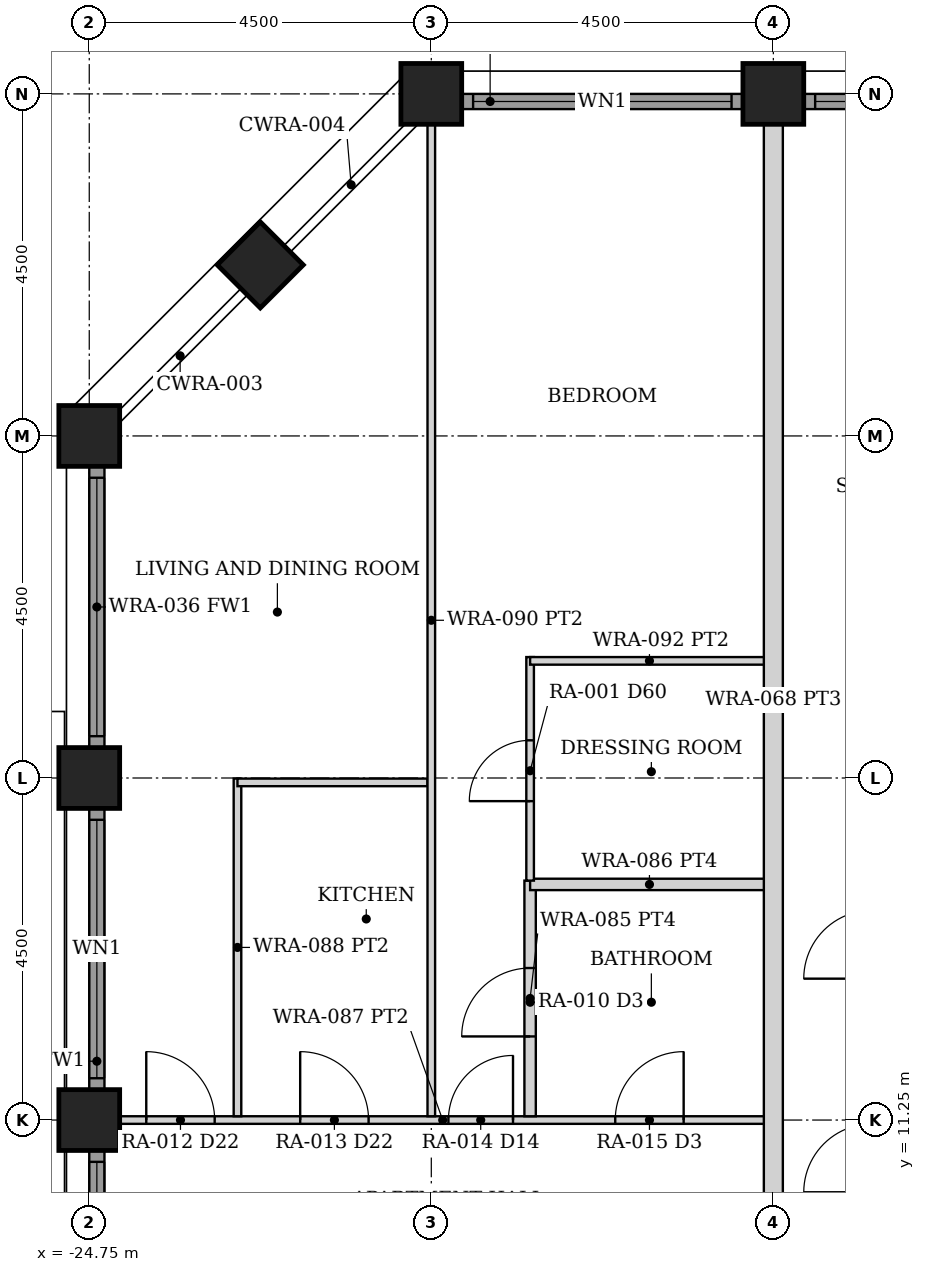
"""IFC4 building model, lengths in metres.
Left out: names, types, materials, properties, quantities, classifications, styles, units other than length and angle.
Written with IfcOpenShell. Run it as: python <this file> out.ifc"""

import sys

from ifc_helpers import new_model, si_unit, direction, frame, frame_2d, origin, origin_2d, place, context, subcontext, project, spatial, rectangle, hollow_rectangle, extrude, element, fill, save


model = new_model("IFC4")
c1 = context("Model", 3, precision=1e-05, world=origin(), true_north=direction((0.0, 1.0)))
c2 = subcontext(c1, "Body", "Model", "MODEL_VIEW")
j1 = project(units=[si_unit("LENGTHUNIT", "METRE"), si_unit("PLANEANGLEUNIT", "RADIAN")], contexts=[c1])
p1 = place(None, origin())
s1 = spatial("IfcSite", under=j1, at=p1, CompositionType="ELEMENT")
p2 = place(p1, origin())
s2 = spatial("IfcBuilding", under=s1, at=p2, CompositionType="ELEMENT")
p3 = place(p2, frame((0.0, 0.0, 26.5)))
s3 = spatial("IfcBuildingStorey", under=s2, at=p3, CompositionType="ELEMENT", Elevation=26.5)
for number, where, z_axis, x_axis in (
    (1, (-20.25, 24.75, 0.0), (0.0, 0.0, 1.0), (0.0, 1.0, 0.0)),
    (2, (-15.75, 24.75, 0.0), (0.0, 0.0, 1.0), (0.0, 1.0, 0.0)),
    (3, (-24.75, 11.25, 0.0), (0.0, 0.0, 1.0), (1.0, 0.0, 0.0)),
    (4, (-24.75, 15.75, 0.0), (0.0, 0.0, 1.0), (1.0, 0.0, 0.0)),
    (5, (-24.75, 20.25, 0.0), (0.0, 0.0, 1.0), (1.0, 0.0, 0.0)),
    (6, (-22.5, 22.5, 0.0), (0.0, 0.0, 1.0), (0.707, -0.707, 0.0)),
):
    element("IfcColumn", number, at=place(p3, frame(where, z_axis=z_axis, x_axis=x_axis)), inside=s3, PredefinedType="COLUMN", context=c2, shape_type="SweptSolid", body=[
        extrude(hollow_rectangle(XDim=0.8, YDim=0.8, WallThickness=0.08, at=origin_2d()), origin(), (0.0, 0.0, 1.0), 3.5),
    ])
p4 = place(p3, frame((-19.845, 24.65, 0.0), z_axis=(0.0, 0.0, 1.0), x_axis=(1.0, 0.0, 0.0)))
e7 = element("IfcWall", 7, at=p4, inside=s3, PredefinedType="SOLIDWALL", context=c2, shape_type="SweptSolid", body=[
    extrude(rectangle(XDim=3.69, YDim=0.2, at=frame_2d((1.845, 0.0))), origin(), (0.0, 0.0, 1.0), 2.379),
])
p5 = place(p4, frame((0.145, 0.0, 0.3)))
e8 = element("IfcOpeningElement", 8, at=p5, cuts=e7, PredefinedType="OPENING", context=c2, shape_type="SweptSolid", body=[
    extrude(rectangle(XDim=3.4, YDim=1.929, at=frame_2d((1.7, 0.964))), frame((0.0, 0.11, 0.0), z_axis=(0.0, -1.0, 0.0), x_axis=(1.0, 0.0, 0.0)), (0.0, 0.0, 1.0), 0.22),
])
p6 = place(p3, frame((-15.345, 24.65, 0.0), z_axis=(0.0, 0.0, 1.0), x_axis=(1.0, 0.0, 0.0)))
e9 = element("IfcWall", 9, at=p6, inside=s3, PredefinedType="SOLIDWALL", context=c2, shape_type="SweptSolid", body=[
    extrude(rectangle(XDim=3.69, YDim=0.2, at=frame_2d((1.845, 0.0))), origin(), (0.0, 0.0, 1.0), 2.379),
])
p7 = place(p6, frame((0.145, 0.0, 0.3)))
e10 = element("IfcOpeningElement", 10, at=p7, cuts=e9, PredefinedType="OPENING", context=c2, shape_type="SweptSolid", body=[
    extrude(rectangle(XDim=3.4, YDim=1.929, at=frame_2d((1.7, 0.964))), frame((0.0, 0.11, 0.0), z_axis=(0.0, -1.0, 0.0), x_axis=(1.0, 0.0, 0.0)), (0.0, 0.0, 1.0), 0.22),
])
p8 = place(p3, frame((-24.65, 7.155, 0.0), z_axis=(0.0, 0.0, 1.0), x_axis=(0.0, 1.0, 0.0)))
e11 = element("IfcWall", 11, at=p8, inside=s3, PredefinedType="SOLIDWALL", context=c2, shape_type="SweptSolid", body=[
    extrude(rectangle(XDim=3.69, YDim=0.2, at=frame_2d((1.845, 0.0))), origin(), (0.0, 0.0, 1.0), 2.379),
])
p9 = place(p8, frame((0.145, 0.0, 0.3)))
e12 = element("IfcOpeningElement", 12, at=p9, cuts=e11, PredefinedType="OPENING", context=c2, shape_type="SweptSolid", body=[
    extrude(rectangle(XDim=3.4, YDim=1.929, at=frame_2d((1.7, 0.964))), frame((0.0, 0.11, 0.0), z_axis=(0.0, -1.0, 0.0), x_axis=(1.0, 0.0, 0.0)), (0.0, 0.0, 1.0), 0.22),
])
p10 = place(p3, frame((-24.65, 11.655, 0.0), z_axis=(0.0, 0.0, 1.0), x_axis=(0.0, 1.0, 0.0)))
e13 = element("IfcWall", 13, at=p10, inside=s3, PredefinedType="SOLIDWALL", context=c2, shape_type="SweptSolid", body=[
    extrude(rectangle(XDim=3.69, YDim=0.2, at=frame_2d((1.845, 0.0))), origin(), (0.0, 0.0, 1.0), 2.379),
])
p11 = place(p10, frame((0.145, 0.0, 0.3)))
e14 = element("IfcOpeningElement", 14, at=p11, cuts=e13, PredefinedType="OPENING", context=c2, shape_type="SweptSolid", body=[
    extrude(rectangle(XDim=3.4, YDim=1.929, at=frame_2d((1.7, 0.964))), frame((0.0, 0.11, 0.0), z_axis=(0.0, -1.0, 0.0), x_axis=(1.0, 0.0, 0.0)), (0.0, 0.0, 1.0), 0.22),
])
p12 = place(p3, frame((-24.65, 16.155, 0.0), z_axis=(0.0, 0.0, 1.0), x_axis=(0.0, 1.0, 0.0)))
e15 = element("IfcWall", 15, at=p12, inside=s3, PredefinedType="SOLIDWALL", context=c2, shape_type="SweptSolid", body=[
    extrude(rectangle(XDim=3.69, YDim=0.2, at=frame_2d((1.845, 0.0))), origin(), (0.0, 0.0, 1.0), 2.379),
])
p13 = place(p12, frame((0.145, 0.0, 0.3)))
e16 = element("IfcOpeningElement", 16, at=p13, cuts=e15, PredefinedType="OPENING", context=c2, shape_type="SweptSolid", body=[
    extrude(rectangle(XDim=3.4, YDim=1.929, at=frame_2d((1.7, 0.964))), frame((0.0, 0.11, 0.0), z_axis=(0.0, -1.0, 0.0), x_axis=(1.0, 0.0, 0.0)), (0.0, 0.0, 1.0), 0.22),
])
p14 = place(p3, frame((-24.35, 11.25, 0.0), z_axis=(0.0, 0.0, 1.0), x_axis=(1.0, 0.0, 0.0)))
e17 = element("IfcWall", 17, at=p14, inside=s3, PredefinedType="PARTITIONING", context=c2, shape_type="SweptSolid", body=[
    extrude(rectangle(XDim=8.5, YDim=0.1, at=frame_2d((4.25, 0.0))), origin(), (0.0, 0.0, 1.0), 2.373),
])
p15 = place(p14, frame((2.375, 0.0, 0.0)))
e18 = element("IfcOpeningElement", 18, at=p15, cuts=e17, PredefinedType="OPENING", context=c2, shape_type="SweptSolid", body=[
    extrude(rectangle(XDim=0.9, YDim=2.1, at=frame_2d((0.45, 1.05))), frame((0.0, 0.06, 0.0), z_axis=(0.0, -1.0, 0.0), x_axis=(1.0, 0.0, 0.0)), (0.0, 0.0, 1.0), 0.12),
])
p16 = place(p14, frame((0.35, 0.0, 0.0)))
e19 = element("IfcOpeningElement", 19, at=p16, cuts=e17, PredefinedType="OPENING", context=c2, shape_type="SweptSolid", body=[
    extrude(rectangle(XDim=0.9, YDim=2.1, at=frame_2d((0.45, 1.05))), frame((0.0, 0.06, 0.0), z_axis=(0.0, -1.0, 0.0), x_axis=(1.0, 0.0, 0.0)), (0.0, 0.0, 1.0), 0.12),
])
p17 = place(p14, frame((4.325, 0.0, 0.0)))
e20 = element("IfcOpeningElement", 20, at=p17, cuts=e17, PredefinedType="OPENING", context=c2, shape_type="SweptSolid", body=[
    extrude(rectangle(XDim=0.85, YDim=2.1, at=frame_2d((0.425, 1.05))), frame((0.0, 0.06, 0.0), z_axis=(0.0, -1.0, 0.0), x_axis=(1.0, 0.0, 0.0)), (0.0, 0.0, 1.0), 0.12),
])
p18 = place(p14, frame((6.52, 0.0, 0.0)))
e21 = element("IfcOpeningElement", 21, at=p18, cuts=e17, PredefinedType="OPENING", context=c2, shape_type="SweptSolid", body=[
    extrude(rectangle(XDim=0.9, YDim=2.1, at=frame_2d((0.45, 1.05))), frame((0.0, 0.06, 0.0), z_axis=(0.0, -1.0, 0.0), x_axis=(1.0, 0.0, 0.0)), (0.0, 0.0, 1.0), 0.12),
])
p19 = place(p3, frame((-22.8, 11.3, 0.0), z_axis=(0.0, 0.0, 1.0), x_axis=(0.0, 1.0, 0.0)))
e22 = element("IfcWall", 22, at=p19, inside=s3, PredefinedType="PARTITIONING", context=c2, shape_type="SweptSolid", body=[
    extrude(rectangle(XDim=4.442, YDim=0.1, at=frame_2d((2.221, 0.0))), origin(), (0.0, 0.0, 1.0), 2.373),
])
p20 = place(p3, frame((-22.8, 15.692, 0.0), z_axis=(0.0, 0.0, 1.0), x_axis=(1.0, 0.0, 0.0)))
e23 = element("IfcWall", 23, at=p20, inside=s3, PredefinedType="PARTITIONING", context=c2, shape_type="SweptSolid", body=[
    extrude(rectangle(XDim=2.5, YDim=0.1, at=frame_2d((1.25, 0.0))), origin(), (0.0, 0.0, 1.0), 2.373),
])
p21 = place(p3, frame((-20.25, 11.3, 0.0), z_axis=(0.0, 0.0, 1.0), x_axis=(0.0, 1.0, 0.0)))
e24 = element("IfcWall", 24, at=p21, inside=s3, PredefinedType="PARTITIONING", context=c2, shape_type="SweptSolid", body=[
    extrude(rectangle(XDim=13.05, YDim=0.1, at=frame_2d((6.525, 0.0))), origin(), (0.0, 0.0, 1.0), 2.373),
])
p22 = place(p3, frame((-18.95, 11.3, 0.0), z_axis=(0.0, 0.0, 1.0), x_axis=(0.0, 1.0, 0.0)))
e25 = element("IfcWall", 25, at=p22, inside=s3, PredefinedType="PARTITIONING", context=c2, shape_type="SweptSolid", body=[
    extrude(rectangle(XDim=3.1, YDim=0.15, at=frame_2d((1.55, 0.0))), origin(), (0.0, 0.0, 1.0), 2.373),
])
p23 = place(p22, frame((1.05, 0.0, 0.0)))
e26 = element("IfcOpeningElement", 26, at=p23, cuts=e25, PredefinedType="OPENING", context=c2, shape_type="SweptSolid", body=[
    extrude(rectangle(XDim=0.9, YDim=2.1, at=frame_2d((0.45, 1.05))), frame((0.0, 0.085, 0.0), z_axis=(0.0, -1.0, 0.0), x_axis=(1.0, 0.0, 0.0)), (0.0, 0.0, 1.0), 0.17),
])
p24 = place(p3, frame((-18.95, 14.35, 0.0), z_axis=(0.0, 0.0, 1.0), x_axis=(1.0, 0.0, 0.0)))
e27 = element("IfcWall", 27, at=p24, inside=s3, PredefinedType="PARTITIONING", context=c2, shape_type="SweptSolid", body=[
    extrude(rectangle(XDim=3.14, YDim=0.15, at=frame_2d((1.57, 0.0))), origin(), (0.0, 0.0, 1.0), 2.373),
])
p25 = place(p3, frame((-18.95, 14.4, 0.0), z_axis=(0.0, 0.0, 1.0), x_axis=(0.0, 1.0, 0.0)))
e28 = element("IfcWall", 28, at=p25, inside=s3, PredefinedType="PARTITIONING", context=c2, shape_type="SweptSolid", body=[
    extrude(rectangle(XDim=2.941, YDim=0.1, at=frame_2d((1.47, 0.0))), origin(), (0.0, 0.0, 1.0), 2.373),
])
p26 = place(p25, frame((1.045, 0.0, 0.0)))
e29 = element("IfcOpeningElement", 29, at=p26, cuts=e28, PredefinedType="OPENING", context=c2, shape_type="SweptSolid", body=[
    extrude(rectangle(XDim=0.8, YDim=2.1, at=frame_2d((0.4, 1.05))), frame((0.0, 0.06, 0.0), z_axis=(0.0, -1.0, 0.0), x_axis=(1.0, 0.0, 0.0)), (0.0, 0.0, 1.0), 0.12),
])
p27 = place(p3, frame((-18.95, 17.291, 0.0), z_axis=(0.0, 0.0, 1.0), x_axis=(1.0, 0.0, 0.0)))
e30 = element("IfcWall", 30, at=p27, inside=s3, PredefinedType="PARTITIONING", context=c2, shape_type="SweptSolid", body=[
    extrude(rectangle(XDim=3.14, YDim=0.1, at=frame_2d((1.57, 0.0))), origin(), (0.0, 0.0, 1.0), 2.373),
])
p28 = place(p3, frame((-15.75, 9.2, 0.0), z_axis=(0.0, 0.0, 1.0), x_axis=(0.0, 1.0, 0.0)))
e31 = element("IfcWall", 31, at=p28, inside=s3, PredefinedType="PARTITIONING", context=c2, shape_type="SweptSolid", body=[
    extrude(rectangle(XDim=15.15, YDim=0.25, at=frame_2d((7.575, 0.0))), origin(), (0.0, 0.0, 1.0), 2.373),
])
p29 = place(p5, origin())
e32 = element("IfcWindow", 32, at=p29, inside=s3, PartitioningType="SINGLE_PANEL", PredefinedType="WINDOW", context=c2, shape_type="SweptSolid", body=[
    extrude(rectangle(XDim=3.4, YDim=1.929, at=frame_2d((1.7, 0.964))), frame((0.0, 0.03, 0.0), z_axis=(0.0, -1.0, 0.0), x_axis=(1.0, 0.0, 0.0)), (0.0, 0.0, 1.0), 0.06),
])
fill(e8, e32)
p30 = place(p7, origin())
e33 = element("IfcWindow", 33, at=p30, inside=s3, PartitioningType="SINGLE_PANEL", PredefinedType="WINDOW", context=c2, shape_type="SweptSolid", body=[
    extrude(rectangle(XDim=3.4, YDim=1.929, at=frame_2d((1.7, 0.964))), frame((0.0, 0.03, 0.0), z_axis=(0.0, -1.0, 0.0), x_axis=(1.0, 0.0, 0.0)), (0.0, 0.0, 1.0), 0.06),
])
fill(e10, e33)
p31 = place(p9, origin())
e34 = element("IfcWindow", 34, at=p31, inside=s3, PartitioningType="SINGLE_PANEL", PredefinedType="WINDOW", context=c2, shape_type="SweptSolid", body=[
    extrude(rectangle(XDim=3.4, YDim=1.929, at=frame_2d((1.7, 0.964))), frame((0.0, 0.03, 0.0), z_axis=(0.0, -1.0, 0.0), x_axis=(1.0, 0.0, 0.0)), (0.0, 0.0, 1.0), 0.06),
])
fill(e12, e34)
p32 = place(p11, origin())
e35 = element("IfcWindow", 35, at=p32, inside=s3, PartitioningType="SINGLE_PANEL", PredefinedType="WINDOW", context=c2, shape_type="SweptSolid", body=[
    extrude(rectangle(XDim=3.4, YDim=1.929, at=frame_2d((1.7, 0.964))), frame((0.0, 0.03, 0.0), z_axis=(0.0, -1.0, 0.0), x_axis=(1.0, 0.0, 0.0)), (0.0, 0.0, 1.0), 0.06),
])
fill(e14, e35)
p33 = place(p13, origin())
e36 = element("IfcWindow", 36, at=p33, inside=s3, PartitioningType="SINGLE_PANEL", PredefinedType="WINDOW", context=c2, shape_type="SweptSolid", body=[
    extrude(rectangle(XDim=3.4, YDim=1.929, at=frame_2d((1.7, 0.964))), frame((0.0, 0.03, 0.0), z_axis=(0.0, -1.0, 0.0), x_axis=(1.0, 0.0, 0.0)), (0.0, 0.0, 1.0), 0.06),
])
fill(e16, e36)
p34 = place(p15, origin())
e37 = element("IfcDoor", 37, at=p34, inside=s3, OperationType="SINGLE_SWING_LEFT", PredefinedType="DOOR", context=c2, shape_type="SweptSolid", body=[
    extrude(rectangle(XDim=0.9, YDim=2.1, at=frame_2d((0.45, 1.05))), frame((0.0, 0.025, 0.0), z_axis=(0.0, -1.0, 0.0), x_axis=(1.0, 0.0, 0.0)), (0.0, 0.0, 1.0), 0.05),
])
fill(e18, e37)
p35 = place(p16, origin())
e38 = element("IfcDoor", 38, at=p35, inside=s3, OperationType="SINGLE_SWING_LEFT", PredefinedType="DOOR", context=c2, shape_type="SweptSolid", body=[
    extrude(rectangle(XDim=0.9, YDim=2.1, at=frame_2d((0.45, 1.05))), frame((0.0, 0.025, 0.0), z_axis=(0.0, -1.0, 0.0), x_axis=(1.0, 0.0, 0.0)), (0.0, 0.0, 1.0), 0.05),
])
fill(e19, e38)
p36 = place(p17, origin())
e39 = element("IfcDoor", 39, at=p36, inside=s3, OperationType="SINGLE_SWING_RIGHT", PredefinedType="DOOR", context=c2, shape_type="SweptSolid", body=[
    extrude(rectangle(XDim=0.85, YDim=2.1, at=frame_2d((0.425, 1.05))), frame((0.0, 0.025, 0.0), z_axis=(0.0, -1.0, 0.0), x_axis=(1.0, 0.0, 0.0)), (0.0, 0.0, 1.0), 0.05),
])
fill(e20, e39)
p37 = place(p23, origin())
e40 = element("IfcDoor", 40, at=p37, inside=s3, OperationType="SINGLE_SWING_LEFT", PredefinedType="DOOR", context=c2, shape_type="SweptSolid", body=[
    extrude(rectangle(XDim=0.9, YDim=2.1, at=frame_2d((0.45, 1.05))), frame((0.0, 0.025, 0.0), z_axis=(0.0, -1.0, 0.0), x_axis=(1.0, 0.0, 0.0)), (0.0, 0.0, 1.0), 0.05),
])
fill(e26, e40)
p38 = place(p18, origin())
e41 = element("IfcDoor", 41, at=p38, inside=s3, OperationType="SINGLE_SWING_RIGHT", PredefinedType="DOOR", context=c2, shape_type="SweptSolid", body=[
    extrude(rectangle(XDim=0.9, YDim=2.1, at=frame_2d((0.45, 1.05))), frame((0.0, 0.025, 0.0), z_axis=(0.0, -1.0, 0.0), x_axis=(1.0, 0.0, 0.0)), (0.0, 0.0, 1.0), 0.05),
])
fill(e21, e41)
p39 = place(p26, origin())
e42 = element("IfcDoor", 42, at=p39, inside=s3, OperationType="SINGLE_SWING_LEFT", PredefinedType="DOOR", context=c2, shape_type="SweptSolid", body=[
    extrude(rectangle(XDim=0.8, YDim=2.1, at=frame_2d((0.4, 1.05))), frame((0.0, 0.025, 0.0), z_axis=(0.0, -1.0, 0.0), x_axis=(1.0, 0.0, 0.0)), (0.0, 0.0, 1.0), 0.05),
])
fill(e29, e42)
save(model, sys.argv[1])
